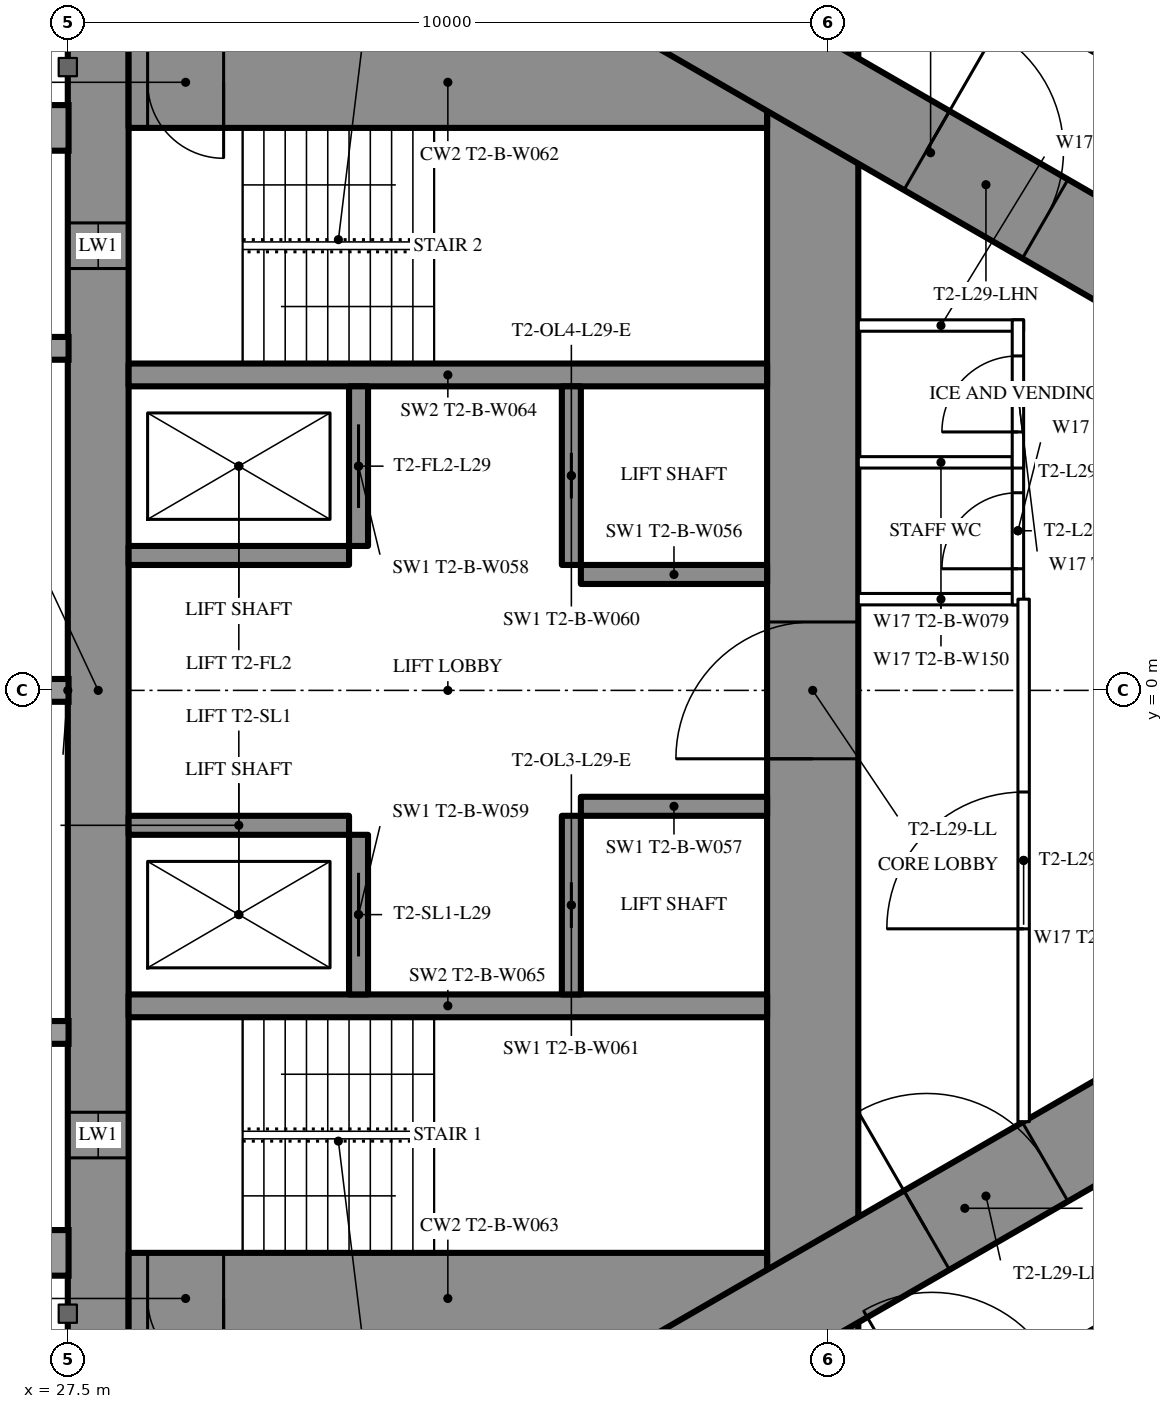
"""IFC4 building model, lengths in metres.
Left out: names, types, materials, properties, quantities, classifications, styles, units other than length and angle.
Written with IfcOpenShell. Run it as: python <this file> out.ifc"""

import sys

from ifc_helpers import new_model, si_unit, direction, frame, frame_2d, origin, place, context, subcontext, project, spatial, rectangle, extrude, element, fill, save


model = new_model("IFC4")
c1 = context("Model", 3, precision=1e-05, world=origin(), true_north=direction((0.0, 1.0)))
c2 = subcontext(c1, "Body", "Model", "MODEL_VIEW")
j1 = project(units=[si_unit("LENGTHUNIT", "METRE"), si_unit("PLANEANGLEUNIT", "RADIAN")], contexts=[c1])
p1 = place(None, origin())
s1 = spatial("IfcSite", under=j1, at=p1, CompositionType="ELEMENT")
p2 = place(p1, origin())
s2 = spatial("IfcBuilding", under=s1, at=p2, CompositionType="ELEMENT")
p3 = place(p2, frame((0.0, 0.0, 111.6)))
s3 = spatial("IfcBuildingStorey", under=s2, at=p3, CompositionType="ELEMENT", Elevation=111.6)
p4 = place(p3, frame((27.9, -8.6, 0.0), z_axis=(0.0, 0.0, 1.0), x_axis=(0.0, 1.0, 0.0)))
e1 = element("IfcWall", 1, at=p4, inside=s3, PredefinedType="SHEAR", context=c2, shape_type="SweptSolid", body=[
    extrude(rectangle(XDim=17.2, YDim=0.8, at=frame_2d((8.6, 0.0))), origin(), (0.0, 0.0, 1.0), 3.5),
])
p5 = place(p4, frame((2.45, 0.0, 0.6)))
e2 = element("IfcOpeningElement", 2, at=p5, cuts=e1, PredefinedType="OPENING", context=c2, shape_type="SweptSolid", body=[
    extrude(rectangle(XDim=0.6, YDim=2.1, at=frame_2d((0.3, 1.05))), frame((0.0, 0.41, 0.0), z_axis=(0.0, -1.0, 0.0), x_axis=(1.0, 0.0, 0.0)), (0.0, 0.0, 1.0), 0.82),
])
p6 = place(p4, frame((14.15, 0.0, 0.6)))
e3 = element("IfcOpeningElement", 3, at=p6, cuts=e1, PredefinedType="OPENING", context=c2, shape_type="SweptSolid", body=[
    extrude(rectangle(XDim=0.6, YDim=2.1, at=frame_2d((0.3, 1.05))), frame((0.0, 0.41, 0.0), z_axis=(0.0, -1.0, 0.0), x_axis=(1.0, 0.0, 0.0)), (0.0, 0.0, 1.0), 0.82),
])
p7 = place(p3, frame((37.3, -8.6, 0.0), z_axis=(0.0, 0.0, 1.0), x_axis=(0.0, 1.0, 0.0)))
e4 = element("IfcWall", 4, at=p7, inside=s3, PredefinedType="SHEAR", context=c2, shape_type="SweptSolid", body=[
    extrude(rectangle(XDim=17.2, YDim=1.2, at=frame_2d((8.6, 0.0))), origin(), (0.0, 0.0, 1.0), 3.5),
])
p8 = place(p7, frame((7.7, 0.0, 0.0)))
e5 = element("IfcOpeningElement", 5, at=p8, cuts=e4, PredefinedType="OPENING", context=c2, shape_type="SweptSolid", body=[
    extrude(rectangle(XDim=1.8, YDim=2.2, at=frame_2d((0.9, 1.1))), frame((0.0, 0.61, 0.0), z_axis=(0.0, -1.0, 0.0), x_axis=(1.0, 0.0, 0.0)), (0.0, 0.0, 1.0), 1.22),
])
p9 = place(p3, frame((28.3, -8.0, 0.0), z_axis=(0.0, 0.0, 1.0), x_axis=(1.0, 0.0, 0.0)))
e6 = element("IfcWall", 6, at=p9, inside=s3, PredefinedType="SHEAR", context=c2, shape_type="SweptSolid", body=[
    extrude(rectangle(XDim=8.4, YDim=1.2, at=frame_2d((4.2, 0.0))), origin(), (0.0, 0.0, 1.0), 3.5),
])
p10 = place(p9, frame((0.25, 0.0, 0.0)))
e7 = element("IfcOpeningElement", 7, at=p10, cuts=e6, PredefinedType="OPENING", context=c2, shape_type="SweptSolid", body=[
    extrude(rectangle(XDim=1.0, YDim=2.2, at=frame_2d((0.5, 1.1))), frame((0.0, 0.61, 0.0), z_axis=(0.0, -1.0, 0.0), x_axis=(1.0, 0.0, 0.0)), (0.0, 0.0, 1.0), 1.22),
])
p11 = place(p3, frame((28.3, 8.0, 0.0), z_axis=(0.0, 0.0, 1.0), x_axis=(1.0, 0.0, 0.0)))
e8 = element("IfcWall", 8, at=p11, inside=s3, PredefinedType="SHEAR", context=c2, shape_type="SweptSolid", body=[
    extrude(rectangle(XDim=8.4, YDim=1.2, at=frame_2d((4.2, 0.0))), origin(), (0.0, 0.0, 1.0), 3.5),
])
p12 = place(p11, frame((0.25, 0.0, 0.0)))
e9 = element("IfcOpeningElement", 9, at=p12, cuts=e8, PredefinedType="OPENING", context=c2, shape_type="SweptSolid", body=[
    extrude(rectangle(XDim=1.0, YDim=2.2, at=frame_2d((0.5, 1.1))), frame((0.0, 0.61, 0.0), z_axis=(0.0, -1.0, 0.0), x_axis=(1.0, 0.0, 0.0)), (0.0, 0.0, 1.0), 1.22),
])
for number, where, z_axis, x_axis in (
    (10, (28.3, -4.15, 0.0), (0.0, 0.0, 1.0), (1.0, 0.0, 0.0)),
    (11, (28.3, 4.15, 0.0), (0.0, 0.0, 1.0), (1.0, 0.0, 0.0)),
):
    element("IfcWall", number, at=place(p3, frame(where, z_axis=z_axis, x_axis=x_axis)), inside=s3, PredefinedType="SHEAR", context=c2, shape_type="SweptSolid", body=[
        extrude(rectangle(XDim=8.4, YDim=0.3, at=frame_2d((4.2, 0.0))), origin(), (0.0, 0.0, 1.0), 3.5),
    ])
p13 = place(p3, frame((31.325, -4.0, 0.0), z_axis=(0.0, 0.0, 1.0), x_axis=(0.0, 1.0, 0.0)))
e12 = element("IfcWall", 12, at=p13, inside=s3, PredefinedType="SHEAR", context=c2, shape_type="SweptSolid", body=[
    extrude(rectangle(XDim=2.1, YDim=0.25, at=frame_2d((1.05, 0.0))), origin(), (0.0, 0.0, 1.0), 3.5),
])
p14 = place(p13, frame((0.5, 0.0, 0.0)))
e13 = element("IfcOpeningElement", 13, at=p14, cuts=e12, PredefinedType="OPENING", context=c2, shape_type="SweptSolid", body=[
    extrude(rectangle(XDim=1.1, YDim=2.2, at=frame_2d((0.55, 1.1))), frame((0.0, 0.135, 0.0), z_axis=(0.0, -1.0, 0.0), x_axis=(1.0, 0.0, 0.0)), (0.0, 0.0, 1.0), 0.27),
])
p15 = place(p3, frame((34.125, -4.0, 0.0), z_axis=(0.0, 0.0, 1.0), x_axis=(0.0, 1.0, 0.0)))
e14 = element("IfcWall", 14, at=p15, inside=s3, PredefinedType="SHEAR", context=c2, shape_type="SweptSolid", body=[
    extrude(rectangle(XDim=2.35, YDim=0.25, at=frame_2d((1.175, 0.0))), origin(), (0.0, 0.0, 1.0), 3.5),
])
p16 = place(p15, frame((0.875, 0.0, 0.0)))
e15 = element("IfcOpeningElement", 15, at=p16, cuts=e14, PredefinedType="OPENING", context=c2, shape_type="SweptSolid", body=[
    extrude(rectangle(XDim=0.6, YDim=2.0, at=frame_2d((0.3, 1.0))), frame((0.0, 0.135, 0.0), z_axis=(0.0, -1.0, 0.0), x_axis=(1.0, 0.0, 0.0)), (0.0, 0.0, 1.0), 0.27),
])
p17 = place(p3, frame((28.3, -1.775, 0.0), z_axis=(0.0, 0.0, 1.0), x_axis=(1.0, 0.0, 0.0)))
e16 = element("IfcWall", 16, at=p17, inside=s3, PredefinedType="SHEAR", context=c2, shape_type="SweptSolid", body=[
    extrude(rectangle(XDim=2.9, YDim=0.25, at=frame_2d((1.45, 0.0))), origin(), (0.0, 0.0, 1.0), 3.5),
])
p18 = place(p3, frame((34.25, -1.525, 0.0), z_axis=(0.0, 0.0, 1.0), x_axis=(1.0, 0.0, 0.0)))
e17 = element("IfcWall", 17, at=p18, inside=s3, PredefinedType="SHEAR", context=c2, shape_type="SweptSolid", body=[
    extrude(rectangle(XDim=2.45, YDim=0.25, at=frame_2d((1.225, 0.0))), origin(), (0.0, 0.0, 1.0), 3.5),
])
p19 = place(p3, frame((31.325, 1.9, 0.0), z_axis=(0.0, 0.0, 1.0), x_axis=(0.0, 1.0, 0.0)))
e18 = element("IfcWall", 18, at=p19, inside=s3, PredefinedType="SHEAR", context=c2, shape_type="SweptSolid", body=[
    extrude(rectangle(XDim=2.1, YDim=0.25, at=frame_2d((1.05, 0.0))), origin(), (0.0, 0.0, 1.0), 3.5),
])
p20 = place(p19, frame((0.5, 0.0, 0.0)))
e19 = element("IfcOpeningElement", 19, at=p20, cuts=e18, PredefinedType="OPENING", context=c2, shape_type="SweptSolid", body=[
    extrude(rectangle(XDim=1.1, YDim=2.2, at=frame_2d((0.55, 1.1))), frame((0.0, 0.135, 0.0), z_axis=(0.0, -1.0, 0.0), x_axis=(1.0, 0.0, 0.0)), (0.0, 0.0, 1.0), 0.27),
])
p21 = place(p3, frame((34.125, 1.65, 0.0), z_axis=(0.0, 0.0, 1.0), x_axis=(0.0, 1.0, 0.0)))
e20 = element("IfcWall", 20, at=p21, inside=s3, PredefinedType="SHEAR", context=c2, shape_type="SweptSolid", body=[
    extrude(rectangle(XDim=2.35, YDim=0.25, at=frame_2d((1.175, 0.0))), origin(), (0.0, 0.0, 1.0), 3.5),
])
p22 = place(p21, frame((0.875, 0.0, 0.0)))
e21 = element("IfcOpeningElement", 21, at=p22, cuts=e20, PredefinedType="OPENING", context=c2, shape_type="SweptSolid", body=[
    extrude(rectangle(XDim=0.6, YDim=2.0, at=frame_2d((0.3, 1.0))), frame((0.0, 0.135, 0.0), z_axis=(0.0, -1.0, 0.0), x_axis=(1.0, 0.0, 0.0)), (0.0, 0.0, 1.0), 0.27),
])
p23 = place(p3, frame((28.3, 1.775, 0.0), z_axis=(0.0, 0.0, 1.0), x_axis=(1.0, 0.0, 0.0)))
e22 = element("IfcWall", 22, at=p23, inside=s3, PredefinedType="SHEAR", context=c2, shape_type="SweptSolid", body=[
    extrude(rectangle(XDim=2.9, YDim=0.25, at=frame_2d((1.45, 0.0))), origin(), (0.0, 0.0, 1.0), 3.5),
])
p24 = place(p3, frame((34.25, 1.525, 0.0), z_axis=(0.0, 0.0, 1.0), x_axis=(1.0, 0.0, 0.0)))
e23 = element("IfcWall", 23, at=p24, inside=s3, PredefinedType="SHEAR", context=c2, shape_type="SweptSolid", body=[
    extrude(rectangle(XDim=2.45, YDim=0.25, at=frame_2d((1.225, 0.0))), origin(), (0.0, 0.0, 1.0), 3.5),
])
p25 = place(p3, frame((27.2, -13.8, 0.0), z_axis=(0.0, 0.0, 1.0), x_axis=(0.866027159892, 0.499996958321, 0.0)))
e24 = element("IfcWall", 24, at=p25, inside=s3, PredefinedType="SHEAR", context=c2, shape_type="SweptSolid", body=[
    extrude(rectangle(XDim=27.947, YDim=1.2, at=frame_2d((13.973, 0.0))), origin(), (0.0, 0.0, 1.0), 3.5),
])
p26 = place(p25, frame((4.6, 0.0, 0.0)))
e25 = element("IfcOpeningElement", 25, at=p26, cuts=e24, PredefinedType="OPENING", context=c2, shape_type="SweptSolid", body=[
    extrude(rectangle(XDim=1.0, YDim=2.2, at=frame_2d((0.5, 1.1))), frame((0.0, 0.61, 0.0), z_axis=(0.0, -1.0, 0.0), x_axis=(1.0, 0.0, 0.0)), (0.0, 0.0, 1.0), 1.22),
])
p27 = place(p25, frame((13.395, 0.0, 0.0)))
e26 = element("IfcOpeningElement", 26, at=p27, cuts=e24, PredefinedType="OPENING", context=c2, shape_type="SweptSolid", body=[
    extrude(rectangle(XDim=1.8, YDim=2.2, at=frame_2d((0.9, 1.1))), frame((0.0, 0.61, 0.0), z_axis=(0.0, -1.0, 0.0), x_axis=(1.0, 0.0, 0.0)), (0.0, 0.0, 1.0), 1.22),
])
p28 = place(p3, frame((27.2, 13.8, 0.0), z_axis=(0.0, 0.0, 1.0), x_axis=(0.866024515034, -0.500001539357, 0.0)))
e27 = element("IfcWall", 27, at=p28, inside=s3, PredefinedType="SHEAR", context=c2, shape_type="SweptSolid", body=[
    extrude(rectangle(XDim=26.907, YDim=1.2, at=frame_2d((13.454, 0.0))), origin(), (0.0, 0.0, 1.0), 3.5),
])
p29 = place(p28, frame((4.6, 0.0, 0.0)))
e28 = element("IfcOpeningElement", 28, at=p29, cuts=e27, PredefinedType="OPENING", context=c2, shape_type="SweptSolid", body=[
    extrude(rectangle(XDim=1.0, YDim=2.2, at=frame_2d((0.5, 1.1))), frame((0.0, 0.61, 0.0), z_axis=(0.0, -1.0, 0.0), x_axis=(1.0, 0.0, 0.0)), (0.0, 0.0, 1.0), 1.22),
])
p30 = place(p28, frame((13.395, 0.0, 0.0)))
e29 = element("IfcOpeningElement", 29, at=p30, cuts=e27, PredefinedType="OPENING", context=c2, shape_type="SweptSolid", body=[
    extrude(rectangle(XDim=1.8, YDim=2.2, at=frame_2d((0.9, 1.1))), frame((0.0, 0.61, 0.0), z_axis=(0.0, -1.0, 0.0), x_axis=(1.0, 0.0, 0.0)), (0.0, 0.0, 1.0), 1.22),
])
p31 = place(p3, frame((37.96, -10.243, 0.0), z_axis=(0.0, 0.0, 1.0), x_axis=(0.866026429433, 0.499998223521, 0.0)))
e30 = element("IfcWall", 30, at=p31, inside=s3, PredefinedType="PARTITIONING", context=c2, shape_type="SweptSolid", body=[
    extrude(rectangle(XDim=20.487, YDim=0.2, at=frame_2d((10.243, 0.0))), origin(), (0.0, 0.0, 1.0), 3.25),
])
p32 = place(p31, frame((4.343, 0.0, 0.0)))
e31 = element("IfcOpeningElement", 31, at=p32, cuts=e30, PredefinedType="OPENING", context=c2, shape_type="SweptSolid", body=[
    extrude(rectangle(XDim=0.95, YDim=2.2, at=frame_2d((0.475, 1.1))), frame((0.0, 0.11, 0.0), z_axis=(0.0, -1.0, 0.0), x_axis=(1.0, 0.0, 0.0)), (0.0, 0.0, 1.0), 0.22),
])
p33 = place(p31, frame((15.385, 0.0, 0.0)))
e32 = element("IfcOpeningElement", 32, at=p33, cuts=e30, PredefinedType="OPENING", context=c2, shape_type="SweptSolid", body=[
    extrude(rectangle(XDim=0.95, YDim=2.2, at=frame_2d((0.475, 1.1))), frame((0.0, 0.11, 0.0), z_axis=(0.0, -1.0, 0.0), x_axis=(1.0, 0.0, 0.0)), (0.0, 0.0, 1.0), 0.22),
])
p34 = place(p31, frame((17.085, 0.0, 0.0)))
e33 = element("IfcOpeningElement", 33, at=p34, cuts=e30, PredefinedType="OPENING", context=c2, shape_type="SweptSolid", body=[
    extrude(rectangle(XDim=0.95, YDim=2.2, at=frame_2d((0.475, 1.1))), frame((0.0, 0.11, 0.0), z_axis=(0.0, -1.0, 0.0), x_axis=(1.0, 0.0, 0.0)), (0.0, 0.0, 1.0), 0.22),
])
p35 = place(p31, frame((1.048, 0.0, 0.0)))
e34 = element("IfcOpeningElement", 34, at=p35, cuts=e30, PredefinedType="OPENING", context=c2, shape_type="SweptSolid", body=[
    extrude(rectangle(XDim=1.8, YDim=2.2, at=frame_2d((0.9, 1.1))), frame((0.0, 0.11, 0.0), z_axis=(0.0, -1.0, 0.0), x_axis=(1.0, 0.0, 0.0)), (0.0, 0.0, 1.0), 0.22),
])
p36 = place(p3, frame((36.834, 10.894, 0.0), z_axis=(0.0, 0.0, 1.0), x_axis=(0.866032723471, -0.499987321717, 0.0)))
e35 = element("IfcWall", 35, at=p36, inside=s3, PredefinedType="PARTITIONING", context=c2, shape_type="SweptSolid", body=[
    extrude(rectangle(XDim=4.947, YDim=0.2, at=frame_2d((2.474, 0.0))), origin(), (0.0, 0.0, 1.0), 3.25),
])
p37 = place(p36, frame((1.006, 0.0, 0.0)))
e36 = element("IfcOpeningElement", 36, at=p37, cuts=e35, PredefinedType="OPENING", context=c2, shape_type="SweptSolid", body=[
    extrude(rectangle(XDim=0.95, YDim=2.2, at=frame_2d((0.475, 1.1))), frame((0.0, 0.11, 0.0), z_axis=(0.0, -1.0, 0.0), x_axis=(1.0, 0.0, 0.0)), (0.0, 0.0, 1.0), 0.22),
])
for number, where, z_axis, x_axis in (
    (37, (37.9, 1.2, 0.0), (0.0, 0.0, 1.0), (1.0, 0.0, 0.0)),
    (38, (37.9, 3.0, 0.0), (0.0, 0.0, 1.0), (1.0, 0.0, 0.0)),
    (39, (37.9, 4.8, 0.0), (0.0, 0.0, 1.0), (1.0, 0.0, 0.0)),
):
    element("IfcWall", number, at=place(p3, frame(where, z_axis=z_axis, x_axis=x_axis)), inside=s3, PredefinedType="PARTITIONING", context=c2, shape_type="SweptSolid", body=[
        extrude(rectangle(XDim=2.175, YDim=0.15, at=frame_2d((1.087, 0.0))), origin(), (0.0, 0.0, 1.0), 3.25),
    ])
p38 = place(p3, frame((40.0, 1.125, 0.0), z_axis=(0.0, 0.0, 1.0), x_axis=(0.0, 1.0, 0.0)))
e40 = element("IfcWall", 40, at=p38, inside=s3, PredefinedType="PARTITIONING", context=c2, shape_type="SweptSolid", body=[
    extrude(rectangle(XDim=1.95, YDim=0.15, at=frame_2d((0.975, 0.0))), origin(), (0.0, 0.0, 1.0), 3.25),
])
p39 = place(p38, frame((0.475, 0.0, 0.0)))
e41 = element("IfcOpeningElement", 41, at=p39, cuts=e40, PredefinedType="OPENING", context=c2, shape_type="SweptSolid", body=[
    extrude(rectangle(XDim=1.0, YDim=2.2, at=frame_2d((0.5, 1.1))), frame((0.0, 0.085, 0.0), z_axis=(0.0, -1.0, 0.0), x_axis=(1.0, 0.0, 0.0)), (0.0, 0.0, 1.0), 0.17),
])
p40 = place(p3, frame((40.0, 2.925, 0.0), z_axis=(0.0, 0.0, 1.0), x_axis=(0.0, 1.0, 0.0)))
e42 = element("IfcWall", 42, at=p40, inside=s3, PredefinedType="PARTITIONING", context=c2, shape_type="SweptSolid", body=[
    extrude(rectangle(XDim=1.95, YDim=0.15, at=frame_2d((0.975, 0.0))), origin(), (0.0, 0.0, 1.0), 3.25),
])
p41 = place(p40, frame((0.475, 0.0, 0.0)))
e43 = element("IfcOpeningElement", 43, at=p41, cuts=e42, PredefinedType="OPENING", context=c2, shape_type="SweptSolid", body=[
    extrude(rectangle(XDim=1.0, YDim=2.2, at=frame_2d((0.5, 1.1))), frame((0.0, 0.085, 0.0), z_axis=(0.0, -1.0, 0.0), x_axis=(1.0, 0.0, 0.0)), (0.0, 0.0, 1.0), 0.17),
])
p42 = place(p3, frame((40.075, -5.674, 0.0), z_axis=(0.0, 0.0, 1.0), x_axis=(0.0, 1.0, 0.0)))
e44 = element("IfcWall", 44, at=p42, inside=s3, PredefinedType="PARTITIONING", context=c2, shape_type="SweptSolid", body=[
    extrude(rectangle(XDim=6.874, YDim=0.15, at=frame_2d((3.437, 0.0))), origin(), (0.0, 0.0, 1.0), 3.25),
])
p43 = place(p42, frame((2.537, 0.0, 0.0)))
e45 = element("IfcOpeningElement", 45, at=p43, cuts=e44, PredefinedType="OPENING", context=c2, shape_type="SweptSolid", body=[
    extrude(rectangle(XDim=1.8, YDim=2.2, at=frame_2d((0.9, 1.1))), frame((0.0, 0.085, 0.0), z_axis=(0.0, -1.0, 0.0), x_axis=(1.0, 0.0, 0.0)), (0.0, 0.0, 1.0), 0.17),
])
p44 = place(p39, origin())
e46 = element("IfcDoor", 46, at=p44, inside=s3, OperationType="SINGLE_SWING_LEFT", PredefinedType="DOOR", context=c2, shape_type="SweptSolid", body=[
    extrude(rectangle(XDim=1.0, YDim=2.2, at=frame_2d((0.5, 1.1))), frame((0.0, 0.025, 0.0), z_axis=(0.0, -1.0, 0.0), x_axis=(1.0, 0.0, 0.0)), (0.0, 0.0, 1.0), 0.05),
])
fill(e41, e46)
p45 = place(p41, origin())
e47 = element("IfcDoor", 47, at=p45, inside=s3, OperationType="SINGLE_SWING_LEFT", PredefinedType="DOOR", context=c2, shape_type="SweptSolid", body=[
    extrude(rectangle(XDim=1.0, YDim=2.2, at=frame_2d((0.5, 1.1))), frame((0.0, 0.025, 0.0), z_axis=(0.0, -1.0, 0.0), x_axis=(1.0, 0.0, 0.0)), (0.0, 0.0, 1.0), 0.05),
])
fill(e43, e47)
p46 = place(p43, origin())
e48 = element("IfcDoor", 48, at=p46, inside=s3, OperationType="DOUBLE_DOOR_SINGLE_SWING", PredefinedType="DOOR", context=c2, shape_type="SweptSolid", body=[
    extrude(rectangle(XDim=1.8, YDim=2.2, at=frame_2d((0.9, 1.1))), frame((0.0, 0.025, 0.0), z_axis=(0.0, -1.0, 0.0), x_axis=(1.0, 0.0, 0.0)), (0.0, 0.0, 1.0), 0.05),
])
fill(e45, e48)
p47 = place(p27, origin())
e49 = element("IfcDoor", 49, at=p47, inside=s3, OperationType="DOUBLE_DOOR_SINGLE_SWING", PredefinedType="DOOR", context=c2, shape_type="SweptSolid", body=[
    extrude(rectangle(XDim=1.8, YDim=2.2, at=frame_2d((0.9, 1.1))), frame((0.0, 0.025, 0.0), z_axis=(0.0, -1.0, 0.0), x_axis=(1.0, 0.0, 0.0)), (0.0, 0.0, 1.0), 0.05),
])
fill(e26, e49)
p48 = place(p30, origin())
e50 = element("IfcDoor", 50, at=p48, inside=s3, OperationType="DOUBLE_DOOR_SINGLE_SWING", PredefinedType="DOOR", context=c2, shape_type="SweptSolid", body=[
    extrude(rectangle(XDim=1.8, YDim=2.2, at=frame_2d((0.9, 1.1))), frame((0.0, 0.025, 0.0), z_axis=(0.0, -1.0, 0.0), x_axis=(1.0, 0.0, 0.0)), (0.0, 0.0, 1.0), 0.05),
])
fill(e29, e50)
p49 = place(p8, origin())
e51 = element("IfcDoor", 51, at=p49, inside=s3, OperationType="DOUBLE_DOOR_SINGLE_SWING", PredefinedType="DOOR", context=c2, shape_type="SweptSolid", body=[
    extrude(rectangle(XDim=1.8, YDim=2.2, at=frame_2d((0.9, 1.1))), frame((0.0, 0.025, 0.0), z_axis=(0.0, -1.0, 0.0), x_axis=(1.0, 0.0, 0.0)), (0.0, 0.0, 1.0), 0.05),
])
fill(e5, e51)
p50 = place(p10, origin())
e52 = element("IfcDoor", 52, at=p50, inside=s3, OperationType="SINGLE_SWING_RIGHT", PredefinedType="DOOR", context=c2, shape_type="SweptSolid", body=[
    extrude(rectangle(XDim=1.0, YDim=2.2, at=frame_2d((0.5, 1.1))), frame((0.0, 0.025, 0.0), z_axis=(0.0, -1.0, 0.0), x_axis=(1.0, 0.0, 0.0)), (0.0, 0.0, 1.0), 0.05),
])
fill(e7, e52)
p51 = place(p12, origin())
e53 = element("IfcDoor", 53, at=p51, inside=s3, OperationType="SINGLE_SWING_RIGHT", PredefinedType="DOOR", context=c2, shape_type="SweptSolid", body=[
    extrude(rectangle(XDim=1.0, YDim=2.2, at=frame_2d((0.5, 1.1))), frame((0.0, 0.025, 0.0), z_axis=(0.0, -1.0, 0.0), x_axis=(1.0, 0.0, 0.0)), (0.0, 0.0, 1.0), 0.05),
])
fill(e9, e53)
p52 = place(p14, origin())
e54 = element("IfcDoor", 54, at=p52, inside=s3, OperationType="SLIDING_TO_LEFT", PredefinedType="USERDEFINED", context=c2, shape_type="SweptSolid", body=[
    extrude(rectangle(XDim=1.1, YDim=2.2, at=frame_2d((0.55, 1.1))), frame((0.0, 0.025, 0.0), z_axis=(0.0, -1.0, 0.0), x_axis=(1.0, 0.0, 0.0)), (0.0, 0.0, 1.0), 0.05),
])
fill(e13, e54)
p53 = place(p20, origin())
e55 = element("IfcDoor", 55, at=p53, inside=s3, OperationType="SLIDING_TO_LEFT", PredefinedType="USERDEFINED", context=c2, shape_type="SweptSolid", body=[
    extrude(rectangle(XDim=1.1, YDim=2.2, at=frame_2d((0.55, 1.1))), frame((0.0, 0.025, 0.0), z_axis=(0.0, -1.0, 0.0), x_axis=(1.0, 0.0, 0.0)), (0.0, 0.0, 1.0), 0.05),
])
fill(e19, e55)
p54 = place(p16, origin())
e56 = element("IfcDoor", 56, at=p54, inside=s3, OperationType="SLIDING_TO_LEFT", PredefinedType="DOOR", context=c2, shape_type="SweptSolid", body=[
    extrude(rectangle(XDim=0.6, YDim=2.0, at=frame_2d((0.3, 1.0))), frame((0.0, 0.025, 0.0), z_axis=(0.0, -1.0, 0.0), x_axis=(1.0, 0.0, 0.0)), (0.0, 0.0, 1.0), 0.05),
])
fill(e15, e56)
p55 = place(p22, origin())
e57 = element("IfcDoor", 57, at=p55, inside=s3, OperationType="SLIDING_TO_LEFT", PredefinedType="DOOR", context=c2, shape_type="SweptSolid", body=[
    extrude(rectangle(XDim=0.6, YDim=2.0, at=frame_2d((0.3, 1.0))), frame((0.0, 0.025, 0.0), z_axis=(0.0, -1.0, 0.0), x_axis=(1.0, 0.0, 0.0)), (0.0, 0.0, 1.0), 0.05),
])
fill(e21, e57)
p56 = place(p5, origin())
e58 = element("IfcWindow", 58, at=p56, inside=s3, PartitioningType="SINGLE_PANEL", PredefinedType="WINDOW", context=c2, shape_type="SweptSolid", body=[
    extrude(rectangle(XDim=0.6, YDim=2.1, at=frame_2d((0.3, 1.05))), frame((0.0, 0.03, 0.0), z_axis=(0.0, -1.0, 0.0), x_axis=(1.0, 0.0, 0.0)), (0.0, 0.0, 1.0), 0.06),
])
fill(e2, e58)
p57 = place(p6, origin())
e59 = element("IfcWindow", 59, at=p57, inside=s3, PartitioningType="SINGLE_PANEL", PredefinedType="WINDOW", context=c2, shape_type="SweptSolid", body=[
    extrude(rectangle(XDim=0.6, YDim=2.1, at=frame_2d((0.3, 1.05))), frame((0.0, 0.03, 0.0), z_axis=(0.0, -1.0, 0.0), x_axis=(1.0, 0.0, 0.0)), (0.0, 0.0, 1.0), 0.06),
])
fill(e3, e59)
save(model, sys.argv[1])
